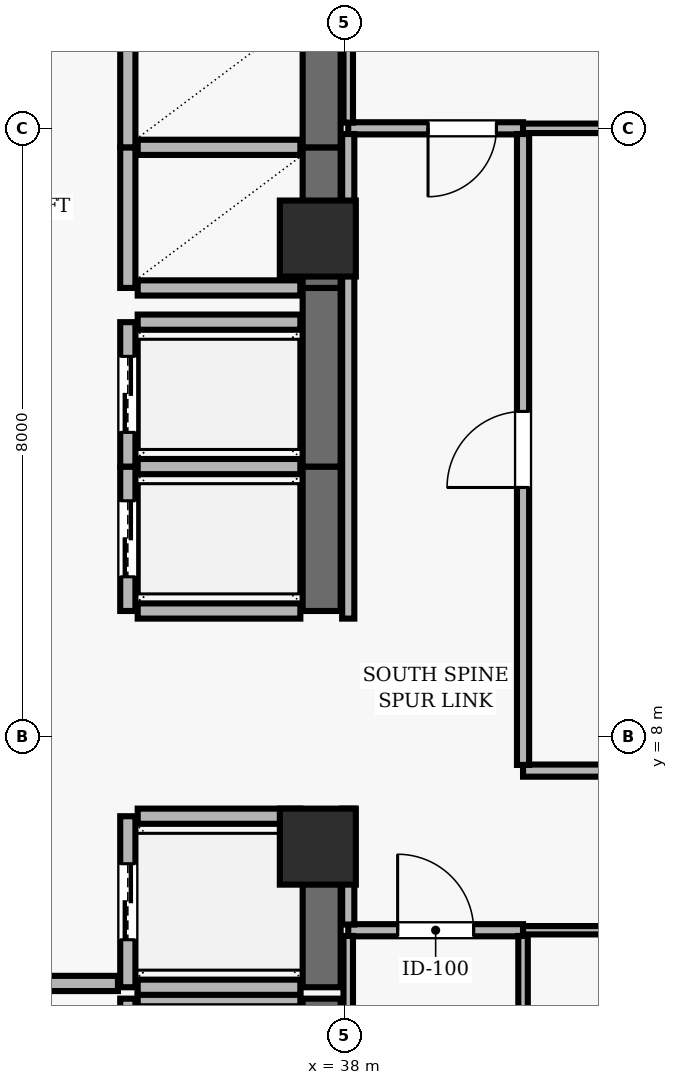
"""IFC4 building model, lengths in metres.
Left out: names, types, materials, properties, quantities, classifications, styles, units other than length and angle.
Written with IfcOpenShell. Run it as: python <this file> out.ifc"""

import sys

from ifc_helpers import new_model, si_unit, direction, frame, frame_2d, origin, origin_2d, place, context, subcontext, project, spatial, rectangle, extrude, element, fill, save


model = new_model("IFC4")
c1 = context("Model", 3, precision=1e-05, world=origin(), true_north=direction((0.0, 1.0)))
c2 = subcontext(c1, "Body", "Model", "MODEL_VIEW")
j1 = project(units=[si_unit("LENGTHUNIT", "METRE"), si_unit("PLANEANGLEUNIT", "RADIAN")], contexts=[c1])
p1 = place(None, origin())
s1 = spatial("IfcSite", under=j1, at=p1, CompositionType="ELEMENT")
p2 = place(p1, origin())
s2 = spatial("IfcBuilding", under=s1, at=p2, CompositionType="ELEMENT")
p3 = place(p2, frame((0.0, 0.0, 179.7)))
s3 = spatial("IfcBuildingStorey", under=s2, at=p3, CompositionType="ELEMENT", Elevation=179.7)
for number, where, z_axis, x_axis in (
    (1, (37.65, 6.55, 0.0), (0.0, 0.0, 1.0), (1.0, 0.0, 0.0)),
    (2, (37.65, 14.55, 0.0), (0.0, 0.0, 1.0), (1.0, 0.0, 0.0)),
):
    element("IfcColumn", number, at=place(p3, frame(where, z_axis=z_axis, x_axis=x_axis)), inside=s3, PredefinedType="COLUMN", context=c2, shape_type="SweptSolid", body=[
        extrude(rectangle(XDim=1.0, YDim=1.0, at=origin_2d()), origin(), (0.0, 0.0, 1.0), 3.9),
    ])
p4 = place(p3, frame((35.15, 4.55, 0.0), z_axis=(0.0, 0.0, 1.0), x_axis=(0.0, -1.0, 0.0)))
e3 = element("IfcWall", 3, at=p4, inside=s3, PredefinedType="SOLIDWALL", context=c2, shape_type="SweptSolid", body=[
    extrude(rectangle(XDim=2.1, YDim=0.2, at=frame_2d((1.05, 0.0))), origin(), (0.0, 0.0, 1.0), 3.69),
])
p5 = place(p4, frame((0.45, 0.0, 0.0)))
e4 = element("IfcOpeningElement", 4, at=p5, cuts=e3, PredefinedType="OPENING", context=c2, shape_type="SweptSolid", body=[
    extrude(rectangle(XDim=1.2, YDim=2.15, at=frame_2d((0.6, 1.075))), frame((0.0, 0.11, 0.0), z_axis=(0.0, -1.0, 0.0), x_axis=(1.0, 0.0, 0.0)), (0.0, 0.0, 1.0), 0.22),
])
p6 = place(p3, frame((37.7, 2.45, 0.0), z_axis=(0.0, 0.0, 1.0), x_axis=(0.0, 1.0, 0.0)))
e5 = element("IfcWall", 5, at=p6, inside=s3, PredefinedType="SHEAR", context=c2, shape_type="SweptSolid", body=[
    extrude(rectangle(XDim=2.1, YDim=0.5, at=frame_2d((1.05, 0.0))), origin(), (0.0, 0.0, 1.0), 3.69),
])
p7 = place(p3, frame((37.42, 4.55, 0.0), z_axis=(0.0, 0.0, 1.0), x_axis=(-1.0, 0.0, 0.0)))
e6 = element("IfcWall", 6, at=p7, inside=s3, PredefinedType="SOLIDWALL", context=c2, shape_type="SweptSolid", body=[
    extrude(rectangle(XDim=2.14, YDim=0.2, at=frame_2d((1.07, 0.0))), origin(), (0.0, 0.0, 1.0), 3.69),
])
p8 = place(p3, frame((35.15, 6.95, 0.0), z_axis=(0.0, 0.0, 1.0), x_axis=(0.0, -1.0, 0.0)))
e7 = element("IfcWall", 7, at=p8, inside=s3, PredefinedType="SOLIDWALL", context=c2, shape_type="SweptSolid", body=[
    extrude(rectangle(XDim=2.25, YDim=0.2, at=frame_2d((1.125, 0.0))), origin(), (0.0, 0.0, 1.0), 3.69),
])
p9 = place(p8, frame((0.625, 0.0, 0.0)))
e8 = element("IfcOpeningElement", 8, at=p9, cuts=e7, PredefinedType="OPENING", context=c2, shape_type="SweptSolid", body=[
    extrude(rectangle(XDim=1.0, YDim=2.1, at=frame_2d((0.5, 1.05))), frame((0.0, 0.11, 0.0), z_axis=(0.0, -1.0, 0.0), x_axis=(1.0, 0.0, 0.0)), (0.0, 0.0, 1.0), 0.22),
])
p10 = place(p3, frame((37.7, 4.7, 0.0), z_axis=(0.0, 0.0, 1.0), x_axis=(0.0, 1.0, 0.0)))
e9 = element("IfcWall", 9, at=p10, inside=s3, PredefinedType="SHEAR", context=c2, shape_type="SweptSolid", body=[
    extrude(rectangle(XDim=2.25, YDim=0.5, at=frame_2d((1.125, 0.0))), origin(), (0.0, 0.0, 1.0), 3.69),
])
for number, where, z_axis, x_axis in (
    (10, (35.28, 4.7, 0.0), (0.0, 0.0, 1.0), (1.0, 0.0, 0.0)),
    (11, (37.42, 6.95, 0.0), (0.0, 0.0, 1.0), (-1.0, 0.0, 0.0)),
):
    element("IfcWall", number, at=place(p3, frame(where, z_axis=z_axis, x_axis=x_axis)), inside=s3, PredefinedType="SOLIDWALL", context=c2, shape_type="SweptSolid", body=[
        extrude(rectangle(XDim=2.14, YDim=0.2, at=frame_2d((1.07, 0.0))), origin(), (0.0, 0.0, 1.0), 3.69),
    ])
p11 = place(p3, frame((35.15, 11.55, 0.0), z_axis=(0.0, 0.0, 1.0), x_axis=(0.0, -1.0, 0.0)))
e12 = element("IfcWall", 12, at=p11, inside=s3, PredefinedType="SOLIDWALL", context=c2, shape_type="SweptSolid", body=[
    extrude(rectangle(XDim=1.9, YDim=0.2, at=frame_2d((0.95, 0.0))), origin(), (0.0, 0.0, 1.0), 3.69),
])
p12 = place(p11, frame((0.45, 0.0, 0.0)))
e13 = element("IfcOpeningElement", 13, at=p12, cuts=e12, PredefinedType="OPENING", context=c2, shape_type="SweptSolid", body=[
    extrude(rectangle(XDim=1.0, YDim=2.1, at=frame_2d((0.5, 1.05))), frame((0.0, 0.11, 0.0), z_axis=(0.0, -1.0, 0.0), x_axis=(1.0, 0.0, 0.0)), (0.0, 0.0, 1.0), 0.22),
])
p13 = place(p3, frame((37.7, 9.65, 0.0), z_axis=(0.0, 0.0, 1.0), x_axis=(0.0, 1.0, 0.0)))
e14 = element("IfcWall", 14, at=p13, inside=s3, PredefinedType="SHEAR", context=c2, shape_type="SweptSolid", body=[
    extrude(rectangle(XDim=1.9, YDim=0.5, at=frame_2d((0.95, 0.0))), origin(), (0.0, 0.0, 1.0), 3.69),
])
for number, where, z_axis, x_axis in (
    (15, (35.28, 9.65, 0.0), (0.0, 0.0, 1.0), (1.0, 0.0, 0.0)),
    (16, (37.42, 11.55, 0.0), (0.0, 0.0, 1.0), (-1.0, 0.0, 0.0)),
):
    element("IfcWall", number, at=place(p3, frame(where, z_axis=z_axis, x_axis=x_axis)), inside=s3, PredefinedType="SOLIDWALL", context=c2, shape_type="SweptSolid", body=[
        extrude(rectangle(XDim=2.14, YDim=0.2, at=frame_2d((1.07, 0.0))), origin(), (0.0, 0.0, 1.0), 3.69),
    ])
p14 = place(p3, frame((35.15, 13.45, 0.0), z_axis=(0.0, 0.0, 1.0), x_axis=(0.0, -1.0, 0.0)))
e17 = element("IfcWall", 17, at=p14, inside=s3, PredefinedType="SOLIDWALL", context=c2, shape_type="SweptSolid", body=[
    extrude(rectangle(XDim=1.9, YDim=0.2, at=frame_2d((0.95, 0.0))), origin(), (0.0, 0.0, 1.0), 3.69),
])
p15 = place(p14, frame((0.45, 0.0, 0.0)))
e18 = element("IfcOpeningElement", 18, at=p15, cuts=e17, PredefinedType="OPENING", context=c2, shape_type="SweptSolid", body=[
    extrude(rectangle(XDim=1.0, YDim=2.1, at=frame_2d((0.5, 1.05))), frame((0.0, 0.11, 0.0), z_axis=(0.0, -1.0, 0.0), x_axis=(1.0, 0.0, 0.0)), (0.0, 0.0, 1.0), 0.22),
])
p16 = place(p3, frame((37.7, 11.55, 0.0), z_axis=(0.0, 0.0, 1.0), x_axis=(0.0, 1.0, 0.0)))
e19 = element("IfcWall", 19, at=p16, inside=s3, PredefinedType="SHEAR", context=c2, shape_type="SweptSolid", body=[
    extrude(rectangle(XDim=2.35, YDim=0.5, at=frame_2d((1.175, 0.0))), origin(), (0.0, 0.0, 1.0), 3.69),
])
p17 = place(p3, frame((37.42, 13.45, 0.0), z_axis=(0.0, 0.0, 1.0), x_axis=(-1.0, 0.0, 0.0)))
e20 = element("IfcWall", 20, at=p17, inside=s3, PredefinedType="SOLIDWALL", context=c2, shape_type="SweptSolid", body=[
    extrude(rectangle(XDim=2.14, YDim=0.2, at=frame_2d((1.07, 0.0))), origin(), (0.0, 0.0, 1.0), 3.69),
])
p18 = place(p3, frame((35.15, 15.75, 0.0), z_axis=(0.0, 0.0, 1.0), x_axis=(0.0, -1.0, 0.0)))
e21 = element("IfcWall", 21, at=p18, inside=s3, PredefinedType="SOLIDWALL", context=c2, shape_type="SweptSolid", body=[
    extrude(rectangle(XDim=1.85, YDim=0.2, at=frame_2d((0.925, 0.0))), origin(), (0.0, 0.0, 1.0), 3.69),
])
p19 = place(p3, frame((37.7, 13.9, 0.0), z_axis=(0.0, 0.0, 1.0), x_axis=(0.0, 1.0, 0.0)))
e22 = element("IfcWall", 22, at=p19, inside=s3, PredefinedType="SHEAR", context=c2, shape_type="SweptSolid", body=[
    extrude(rectangle(XDim=1.85, YDim=0.5, at=frame_2d((0.925, 0.0))), origin(), (0.0, 0.0, 1.0), 3.69),
])
for number, where, z_axis, x_axis in (
    (23, (35.28, 13.9, 0.0), (0.0, 0.0, 1.0), (1.0, 0.0, 0.0)),
    (24, (37.42, 15.75, 0.0), (0.0, 0.0, 1.0), (-1.0, 0.0, 0.0)),
):
    element("IfcWall", number, at=place(p3, frame(where, z_axis=z_axis, x_axis=x_axis)), inside=s3, PredefinedType="SOLIDWALL", context=c2, shape_type="SweptSolid", body=[
        extrude(rectangle(XDim=2.14, YDim=0.2, at=frame_2d((1.07, 0.0))), origin(), (0.0, 0.0, 1.0), 3.69),
    ])
p20 = place(p3, frame((35.15, 17.6, 0.0), z_axis=(0.0, 0.0, 1.0), x_axis=(0.0, -1.0, 0.0)))
e25 = element("IfcWall", 25, at=p20, inside=s3, PredefinedType="SOLIDWALL", context=c2, shape_type="SweptSolid", body=[
    extrude(rectangle(XDim=1.85, YDim=0.2, at=frame_2d((0.925, 0.0))), origin(), (0.0, 0.0, 1.0), 3.69),
])
p21 = place(p3, frame((37.7, 15.75, 0.0), z_axis=(0.0, 0.0, 1.0), x_axis=(0.0, 1.0, 0.0)))
e26 = element("IfcWall", 26, at=p21, inside=s3, PredefinedType="SHEAR", context=c2, shape_type="SweptSolid", body=[
    extrude(rectangle(XDim=1.85, YDim=0.5, at=frame_2d((0.925, 0.0))), origin(), (0.0, 0.0, 1.0), 3.69),
])
p22 = place(p3, frame((35.02, 4.75, 0.0), z_axis=(0.0, 0.0, 1.0), x_axis=(-1.0, 0.0, 0.0)))
e27 = element("IfcWall", 27, at=p22, inside=s3, PredefinedType="SOLIDWALL", context=c2, shape_type="SweptSolid", body=[
    extrude(rectangle(XDim=3.11, YDim=0.2, at=frame_2d((1.555, 0.0))), origin(), (0.0, 0.0, 1.0), 3.69),
])
p23 = place(p22, frame((1.03, 0.0, 0.0)))
e28 = element("IfcOpeningElement", 28, at=p23, cuts=e27, PredefinedType="OPENING", context=c2, shape_type="SweptSolid", body=[
    extrude(rectangle(XDim=1.05, YDim=2.15, at=frame_2d((0.525, 1.075))), frame((0.0, 0.11, 0.0), z_axis=(0.0, -1.0, 0.0), x_axis=(1.0, 0.0, 0.0)), (0.0, 0.0, 1.0), 0.22),
])
p24 = place(p3, frame((38.05, 5.45, 0.0), z_axis=(0.0, 0.0, 1.0), x_axis=(1.0, 0.0, 0.0)))
e29 = element("IfcWall", 29, at=p24, inside=s3, PredefinedType="PARTITIONING", context=c2, shape_type="SweptSolid", body=[
    extrude(rectangle(XDim=2.3, YDim=0.16, at=frame_2d((1.15, 0.0))), origin(), (0.0, 0.0, 1.0), 3.372),
])
p25 = place(p24, frame((0.65, 0.0, 0.0)))
e30 = element("IfcOpeningElement", 30, at=p25, cuts=e29, PredefinedType="OPENING", context=c2, shape_type="SweptSolid", body=[
    extrude(rectangle(XDim=1.0, YDim=2.1, at=frame_2d((0.5, 1.05))), frame((0.0, 0.09, 0.0), z_axis=(0.0, -1.0, 0.0), x_axis=(1.0, 0.0, 0.0)), (0.0, 0.0, 1.0), 0.18),
])
p26 = place(p3, frame((40.35, 5.45, 0.0), z_axis=(0.0, 0.0, 1.0), x_axis=(1.0, 0.0, 0.0)))
e31 = element("IfcWall", 31, at=p26, inside=s3, PredefinedType="MOVABLE", context=c2, shape_type="SweptSolid", body=[
    extrude(rectangle(XDim=8.2, YDim=0.11, at=frame_2d((4.1, 0.0))), origin(), (0.0, 0.0, 1.0), 3.372),
])
p27 = place(p26, frame((3.65, 0.0, 0.0)))
e32 = element("IfcOpeningElement", 32, at=p27, cuts=e31, PredefinedType="OPENING", context=c2, shape_type="SweptSolid", body=[
    extrude(rectangle(XDim=0.9, YDim=2.1, at=frame_2d((0.45, 1.05))), frame((0.0, 0.065, 0.0), z_axis=(0.0, -1.0, 0.0), x_axis=(1.0, 0.0, 0.0)), (0.0, 0.0, 1.0), 0.13),
])
p28 = place(p3, frame((40.35, 16.0, 0.0), z_axis=(0.0, 0.0, 1.0), x_axis=(-1.0, 0.0, 0.0)))
e33 = element("IfcWall", 33, at=p28, inside=s3, PredefinedType="PARTITIONING", context=c2, shape_type="SweptSolid", body=[
    extrude(rectangle(XDim=2.3, YDim=0.16, at=frame_2d((1.15, 0.0))), origin(), (0.0, 0.0, 1.0), 3.69),
])
p29 = place(p28, frame((0.35, 0.0, 0.0)))
e34 = element("IfcOpeningElement", 34, at=p29, cuts=e33, PredefinedType="OPENING", context=c2, shape_type="SweptSolid", body=[
    extrude(rectangle(XDim=0.9, YDim=2.1, at=frame_2d((0.45, 1.05))), frame((0.0, 0.09, 0.0), z_axis=(0.0, -1.0, 0.0), x_axis=(1.0, 0.0, 0.0)), (0.0, 0.0, 1.0), 0.18),
])
p30 = place(p3, frame((48.55, 7.55, 0.0), z_axis=(0.0, 0.0, 1.0), x_axis=(-1.0, 0.0, 0.0)))
e35 = element("IfcWall", 35, at=p30, inside=s3, PredefinedType="PARTITIONING", context=c2, shape_type="SweptSolid", body=[
    extrude(rectangle(XDim=8.2, YDim=0.16, at=frame_2d((4.1, 0.0))), origin(), (0.0, 0.0, 1.0), 3.146),
])
p31 = place(p3, frame((48.55, 16.0, 0.0), z_axis=(0.0, 0.0, 1.0), x_axis=(-1.0, 0.0, 0.0)))
e36 = element("IfcWall", 36, at=p31, inside=s3, PredefinedType="PARTITIONING", context=c2, shape_type="SweptSolid", body=[
    extrude(rectangle(XDim=8.2, YDim=0.125, at=frame_2d((4.1, 0.0))), origin(), (0.0, 0.0, 1.0), 3.69),
])
p32 = place(p3, frame((38.05, 5.375, 0.0), z_axis=(0.0, 0.0, 1.0), x_axis=(0.0, -1.0, 0.0)))
e37 = element("IfcWall", 37, at=p32, inside=s3, PredefinedType="PARTITIONING", context=c2, shape_type="SweptSolid", body=[
    extrude(rectangle(XDim=5.23, YDim=0.125, at=frame_2d((2.615, 0.0))), origin(), (0.0, 0.0, 1.0), 3.146),
])
p33 = place(p3, frame((38.05, 7.05, 0.0), z_axis=(0.0, 0.0, 1.0), x_axis=(0.0, -1.0, 0.0)))
e38 = element("IfcWall", 38, at=p33, inside=s3, PredefinedType="PARTITIONING", context=c2, shape_type="SweptSolid", body=[
    extrude(rectangle(XDim=1.525, YDim=0.16, at=frame_2d((0.763, 0.0))), origin(), (0.0, 0.0, 1.0), 3.146),
])
p34 = place(p3, frame((38.05, 15.925, 0.0), z_axis=(0.0, 0.0, 1.0), x_axis=(0.0, -1.0, 0.0)))
e39 = element("IfcWall", 39, at=p34, inside=s3, PredefinedType="PARTITIONING", context=c2, shape_type="SweptSolid", body=[
    extrude(rectangle(XDim=6.375, YDim=0.16, at=frame_2d((3.188, 0.0))), origin(), (0.0, 0.0, 1.0), 3.146),
])
p35 = place(p3, frame((38.05, 24.0, 0.0), z_axis=(0.0, 0.0, 1.0), x_axis=(0.0, -1.0, 0.0)))
e40 = element("IfcWall", 40, at=p35, inside=s3, PredefinedType="PARTITIONING", context=c2, shape_type="SweptSolid", body=[
    extrude(rectangle(XDim=7.925, YDim=0.125, at=frame_2d((3.962, 0.0))), origin(), (0.0, 0.0, 1.0), 3.146),
])
p36 = place(p3, frame((40.35, 0.145, 0.0), z_axis=(0.0, 0.0, 1.0), x_axis=(0.0, 1.0, 0.0)))
e41 = element("IfcWall", 41, at=p36, inside=s3, PredefinedType="PARTITIONING", context=c2, shape_type="SweptSolid", body=[
    extrude(rectangle(XDim=5.23, YDim=0.125, at=frame_2d((2.615, 0.0))), origin(), (0.0, 0.0, 1.0), 3.69),
])
p37 = place(p3, frame((40.35, 7.625, 0.0), z_axis=(0.0, 0.0, 1.0), x_axis=(0.0, 1.0, 0.0)))
e42 = element("IfcWall", 42, at=p37, inside=s3, PredefinedType="PARTITIONING", context=c2, shape_type="SweptSolid", body=[
    extrude(rectangle(XDim=8.3, YDim=0.16, at=frame_2d((4.15, 0.0))), origin(), (0.0, 0.0, 1.0), 3.372),
])
p38 = place(p37, frame((3.65, 0.0, 0.0)))
e43 = element("IfcOpeningElement", 43, at=p38, cuts=e42, PredefinedType="OPENING", context=c2, shape_type="SweptSolid", body=[
    extrude(rectangle(XDim=1.0, YDim=2.1, at=frame_2d((0.5, 1.05))), frame((0.0, 0.09, 0.0), z_axis=(0.0, -1.0, 0.0), x_axis=(1.0, 0.0, 0.0)), (0.0, 0.0, 1.0), 0.18),
])
p39 = place(p9, origin())
e44 = element("IfcDoor", 44, at=p39, inside=s3, OperationType="DOUBLE_DOOR_SLIDING", PredefinedType="DOOR", context=c2, shape_type="SweptSolid", body=[
    extrude(rectangle(XDim=1.0, YDim=2.1, at=frame_2d((0.5, 1.05))), frame((0.0, 0.025, 0.0), z_axis=(0.0, -1.0, 0.0), x_axis=(1.0, 0.0, 0.0)), (0.0, 0.0, 1.0), 0.05),
])
fill(e8, e44)
p40 = place(p12, origin())
e45 = element("IfcDoor", 45, at=p40, inside=s3, OperationType="DOUBLE_DOOR_SLIDING", PredefinedType="DOOR", context=c2, shape_type="SweptSolid", body=[
    extrude(rectangle(XDim=1.0, YDim=2.1, at=frame_2d((0.5, 1.05))), frame((0.0, 0.025, 0.0), z_axis=(0.0, -1.0, 0.0), x_axis=(1.0, 0.0, 0.0)), (0.0, 0.0, 1.0), 0.05),
])
fill(e13, e45)
p41 = place(p15, origin())
e46 = element("IfcDoor", 46, at=p41, inside=s3, OperationType="DOUBLE_DOOR_SLIDING", PredefinedType="DOOR", context=c2, shape_type="SweptSolid", body=[
    extrude(rectangle(XDim=1.0, YDim=2.1, at=frame_2d((0.5, 1.05))), frame((0.0, 0.025, 0.0), z_axis=(0.0, -1.0, 0.0), x_axis=(1.0, 0.0, 0.0)), (0.0, 0.0, 1.0), 0.05),
])
fill(e18, e46)
p42 = place(p25, origin())
e47 = element("IfcDoor", 47, at=p42, inside=s3, OperationType="SINGLE_SWING_LEFT", PredefinedType="DOOR", context=c2, shape_type="SweptSolid", body=[
    extrude(rectangle(XDim=1.0, YDim=2.1, at=frame_2d((0.5, 1.05))), frame((0.0, 0.025, 0.0), z_axis=(0.0, -1.0, 0.0), x_axis=(1.0, 0.0, 0.0)), (0.0, 0.0, 1.0), 0.05),
])
fill(e30, e47)
p43 = place(p38, origin())
e48 = element("IfcDoor", 48, at=p43, inside=s3, OperationType="SINGLE_SWING_LEFT", PredefinedType="DOOR", context=c2, shape_type="SweptSolid", body=[
    extrude(rectangle(XDim=1.0, YDim=2.1, at=frame_2d((0.5, 1.05))), frame((0.0, 0.025, 0.0), z_axis=(0.0, -1.0, 0.0), x_axis=(1.0, 0.0, 0.0)), (0.0, 0.0, 1.0), 0.05),
])
fill(e43, e48)
p44 = place(p29, origin())
e49 = element("IfcDoor", 49, at=p44, inside=s3, OperationType="SINGLE_SWING_RIGHT", PredefinedType="DOOR", context=c2, shape_type="SweptSolid", body=[
    extrude(rectangle(XDim=0.9, YDim=2.1, at=frame_2d((0.45, 1.05))), frame((0.0, 0.025, 0.0), z_axis=(0.0, -1.0, 0.0), x_axis=(1.0, 0.0, 0.0)), (0.0, 0.0, 1.0), 0.05),
])
fill(e34, e49)
save(model, sys.argv[1])
